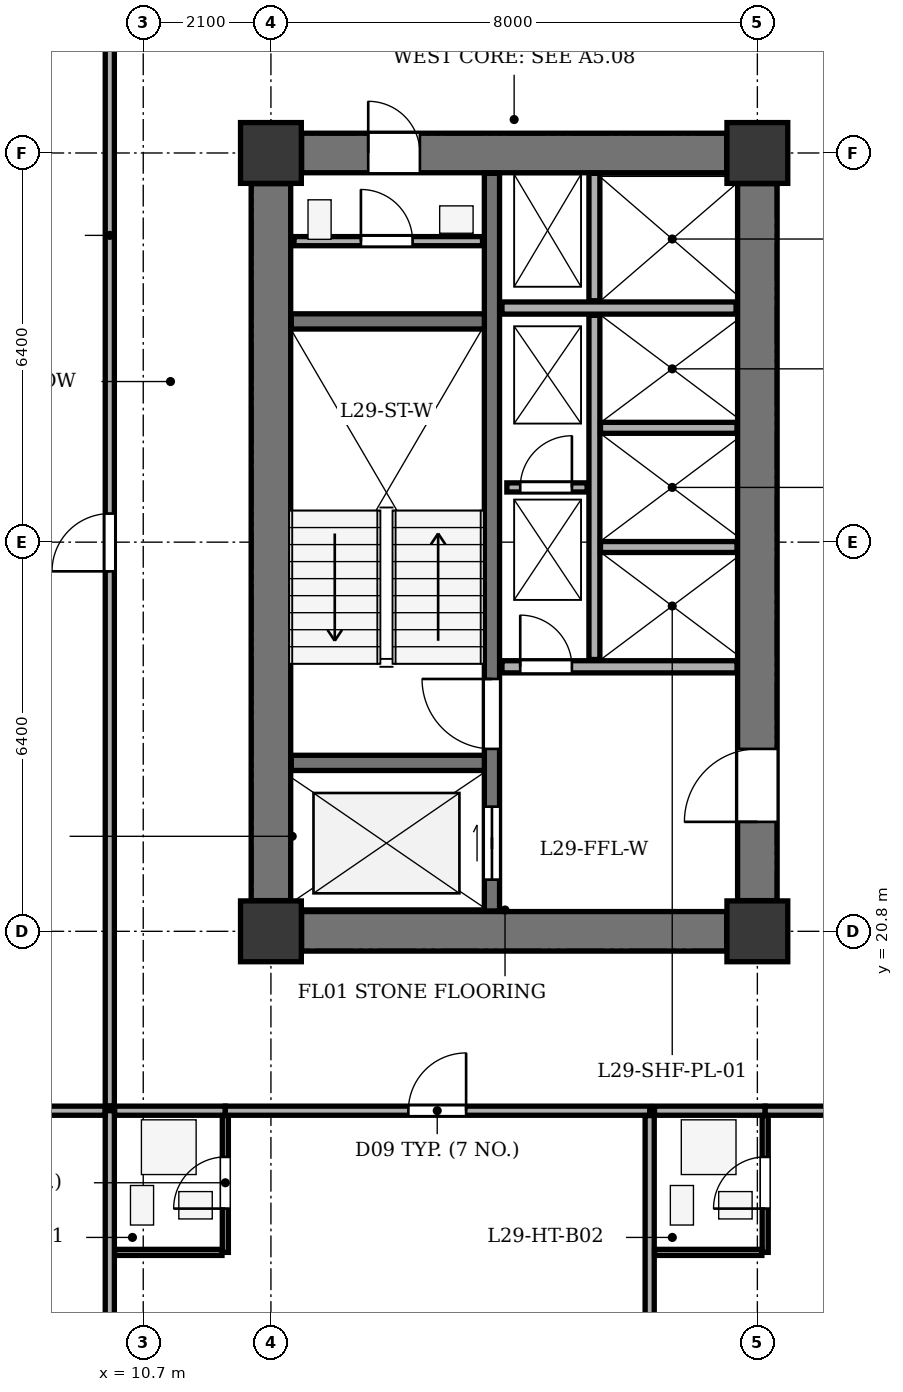
"""IFC4 building model, lengths in metres.
Left out: names, types, materials, properties, quantities, classifications, styles, units other than length and angle.
Written with IfcOpenShell. Run it as: python <this file> out.ifc"""

import sys

from ifc_helpers import new_model, si_unit, direction, frame, frame_2d, origin, origin_2d, place, context, subcontext, project, spatial, rectangle, extrude, element, fill, save


model = new_model("IFC4")
c1 = context("Model", 3, precision=1e-05, world=origin(), true_north=direction((0.0, 1.0)))
c2 = subcontext(c1, "Body", "Model", "MODEL_VIEW")
j1 = project(units=[si_unit("LENGTHUNIT", "METRE"), si_unit("PLANEANGLEUNIT", "RADIAN")], contexts=[c1])
p1 = place(None, origin())
s1 = spatial("IfcSite", under=j1, at=p1, CompositionType="ELEMENT")
p2 = place(p1, origin())
s2 = spatial("IfcBuilding", under=s1, at=p2, CompositionType="ELEMENT")
p3 = place(p2, frame((0.0, 0.0, 120.3)))
s3 = spatial("IfcBuildingStorey", under=s2, at=p3, CompositionType="ELEMENT", Elevation=120.3)
for number, where, z_axis, x_axis in (
    (1, (12.8, 20.8, 0.0), (0.0, 0.0, 1.0), (1.0, 0.0, 0.0)),
    (2, (20.8, 20.8, 0.0), (0.0, 0.0, 1.0), (1.0, 0.0, 0.0)),
    (3, (12.8, 33.6, 0.0), (0.0, 0.0, 1.0), (1.0, 0.0, 0.0)),
    (4, (20.8, 33.6, 0.0), (0.0, 0.0, 1.0), (1.0, 0.0, 0.0)),
):
    element("IfcColumn", number, at=place(p3, frame(where, z_axis=z_axis, x_axis=x_axis)), inside=s3, PredefinedType="COLUMN", context=c2, shape_type="SweptSolid", body=[
        extrude(rectangle(XDim=1.0, YDim=1.0, at=origin_2d()), origin(), (0.0, 0.0, 1.0), 3.5),
    ])
p4 = place(p3, frame((12.8, 21.305, 0.0), z_axis=(0.0, 0.0, 1.0), x_axis=(0.0, 1.0, 0.0)))
e5 = element("IfcWall", 5, at=p4, inside=s3, PredefinedType="SHEAR", context=c2, shape_type="SweptSolid", body=[
    extrude(rectangle(XDim=11.79, YDim=0.65, at=frame_2d((5.895, 0.0))), origin(), (0.0, 0.0, 1.0), 3.2),
])
p5 = place(p3, frame((13.305, 20.8, 0.0), z_axis=(0.0, 0.0, 1.0), x_axis=(1.0, 0.0, 0.0)))
e6 = element("IfcWall", 6, at=p5, inside=s3, PredefinedType="SHEAR", context=c2, shape_type="SweptSolid", body=[
    extrude(rectangle(XDim=6.99, YDim=0.65, at=frame_2d((3.495, 0.0))), origin(), (0.0, 0.0, 1.0), 3.2),
])
p6 = place(p3, frame((13.305, 33.6, 0.0), z_axis=(0.0, 0.0, 1.0), x_axis=(1.0, 0.0, 0.0)))
e7 = element("IfcWall", 7, at=p6, inside=s3, PredefinedType="SHEAR", context=c2, shape_type="SweptSolid", body=[
    extrude(rectangle(XDim=6.99, YDim=0.65, at=frame_2d((3.495, 0.0))), origin(), (0.0, 0.0, 1.0), 3.2),
])
p7 = place(p6, frame((1.095, 0.0, 0.0)))
e8 = element("IfcOpeningElement", 8, at=p7, cuts=e7, PredefinedType="OPENING", context=c2, shape_type="SweptSolid", body=[
    extrude(rectangle(XDim=0.85, YDim=2.02, at=frame_2d((0.425, 1.01))), frame((0.0, 0.335, 0.0), z_axis=(0.0, -1.0, 0.0), x_axis=(1.0, 0.0, 0.0)), (0.0, 0.0, 1.0), 0.67),
])
p8 = place(p3, frame((20.8, 21.305, 0.0), z_axis=(0.0, 0.0, 1.0), x_axis=(0.0, 1.0, 0.0)))
e9 = element("IfcWall", 9, at=p8, inside=s3, PredefinedType="SHEAR", context=c2, shape_type="SweptSolid", body=[
    extrude(rectangle(XDim=11.79, YDim=0.65, at=frame_2d((5.895, 0.0))), origin(), (0.0, 0.0, 1.0), 3.2),
])
p9 = place(p8, frame((1.295, 0.0, 0.0)))
e10 = element("IfcOpeningElement", 10, at=p9, cuts=e9, PredefinedType="OPENING", context=c2, shape_type="SweptSolid", body=[
    extrude(rectangle(XDim=1.2, YDim=2.15, at=frame_2d((0.6, 1.075))), frame((0.0, 0.335, 0.0), z_axis=(0.0, -1.0, 0.0), x_axis=(1.0, 0.0, 0.0)), (0.0, 0.0, 1.0), 0.67),
])
p10 = place(p3, frame((16.435, 21.135, 0.0), z_axis=(0.0, 0.0, 1.0), x_axis=(0.0, 1.0, 0.0)))
e11 = element("IfcWall", 11, at=p10, inside=s3, PredefinedType="SHEAR", context=c2, shape_type="SweptSolid", body=[
    extrude(rectangle(XDim=12.13, YDim=0.25, at=frame_2d((6.065, 0.0))), origin(), (0.0, 0.0, 1.0), 3.2),
])
p11 = place(p10, frame((0.515, 0.0, 0.0)))
e12 = element("IfcOpeningElement", 12, at=p11, cuts=e11, PredefinedType="OPENING", context=c2, shape_type="SweptSolid", body=[
    extrude(rectangle(XDim=1.2, YDim=2.15, at=frame_2d((0.6, 1.075))), frame((0.0, 0.135, 0.0), z_axis=(0.0, -1.0, 0.0), x_axis=(1.0, 0.0, 0.0)), (0.0, 0.0, 1.0), 0.27),
])
p12 = place(p10, frame((2.665, 0.0, 0.0)))
e13 = element("IfcOpeningElement", 13, at=p12, cuts=e11, PredefinedType="OPENING", context=c2, shape_type="SweptSolid", body=[
    extrude(rectangle(XDim=1.15, YDim=2.15, at=frame_2d((0.575, 1.075))), frame((0.0, 0.135, 0.0), z_axis=(0.0, -1.0, 0.0), x_axis=(1.0, 0.0, 0.0)), (0.0, 0.0, 1.0), 0.27),
])
for number, where, z_axis, x_axis in (
    (14, (13.135, 23.57, 0.0), (0.0, 0.0, 1.0), (1.0, 0.0, 0.0)),
    (15, (13.135, 30.83, 0.0), (0.0, 0.0, 1.0), (1.0, 0.0, 0.0)),
):
    element("IfcWall", number, at=place(p3, frame(where, z_axis=z_axis, x_axis=x_axis)), inside=s3, PredefinedType="SHEAR", context=c2, shape_type="SweptSolid", body=[
        extrude(rectangle(XDim=3.175, YDim=0.25, at=frame_2d((1.587, 0.0))), origin(), (0.0, 0.0, 1.0), 3.2),
    ])
p13 = place(p3, frame((16.6, 25.15, 0.0), z_axis=(0.0, 0.0, 1.0), x_axis=(1.0, 0.0, 0.0)))
e16 = element("IfcWall", 16, at=p13, inside=s3, PredefinedType="SOLIDWALL", context=c2, shape_type="SweptSolid", body=[
    extrude(rectangle(XDim=3.865, YDim=0.2, at=frame_2d((1.933, 0.0))), origin(), (0.0, 0.0, 1.0), 3.2),
])
p14 = place(p13, frame((0.3, 0.0, 0.0)))
e17 = element("IfcOpeningElement", 17, at=p14, cuts=e16, PredefinedType="OPENING", context=c2, shape_type="SweptSolid", body=[
    extrude(rectangle(XDim=0.85, YDim=2.02, at=frame_2d((0.425, 1.01))), frame((0.0, 0.11, 0.0), z_axis=(0.0, -1.0, 0.0), x_axis=(1.0, 0.0, 0.0)), (0.0, 0.0, 1.0), 0.22),
])
p15 = place(p3, frame((16.6, 31.05, 0.0), z_axis=(0.0, 0.0, 1.0), x_axis=(1.0, 0.0, 0.0)))
e18 = element("IfcWall", 18, at=p15, inside=s3, PredefinedType="SOLIDWALL", context=c2, shape_type="SweptSolid", body=[
    extrude(rectangle(XDim=3.85, YDim=0.2, at=frame_2d((1.925, 0.0))), origin(), (0.0, 0.0, 1.0), 3.2),
])
p16 = place(p3, frame((18.12, 25.27, 0.0), z_axis=(0.0, 0.0, 1.0), x_axis=(0.0, 1.0, 0.0)))
e19 = element("IfcWall", 19, at=p16, inside=s3, PredefinedType="PARTITIONING", context=c2, shape_type="SweptSolid", body=[
    extrude(rectangle(XDim=5.66, YDim=0.18, at=frame_2d((2.83, 0.0))), origin(), (0.0, 0.0, 1.0), 3.2),
])
p17 = place(p3, frame((18.12, 31.17, 0.0), z_axis=(0.0, 0.0, 1.0), x_axis=(0.0, 1.0, 0.0)))
e20 = element("IfcWall", 20, at=p17, inside=s3, PredefinedType="PARTITIONING", context=c2, shape_type="SweptSolid", body=[
    extrude(rectangle(XDim=2.095, YDim=0.18, at=frame_2d((1.047, 0.0))), origin(), (0.0, 0.0, 1.0), 3.2),
])
for number, where, z_axis, x_axis in (
    (21, (18.22, 27.12, 0.0), (0.0, 0.0, 1.0), (1.0, 0.0, 0.0)),
    (22, (18.22, 29.08, 0.0), (0.0, 0.0, 1.0), (1.0, 0.0, 0.0)),
):
    element("IfcWall", number, at=place(p3, frame(where, z_axis=z_axis, x_axis=x_axis)), inside=s3, PredefinedType="PARTITIONING", context=c2, shape_type="SweptSolid", body=[
        extrude(rectangle(XDim=2.245, YDim=0.18, at=frame_2d((1.123, 0.0))), origin(), (0.0, 0.0, 1.0), 3.2),
    ])
p18 = place(p3, frame((13.18, 32.15, 0.0), z_axis=(0.0, 0.0, 1.0), x_axis=(1.0, 0.0, 0.0)))
e23 = element("IfcWall", 23, at=p18, inside=s3, PredefinedType="PARTITIONING", context=c2, shape_type="SweptSolid", body=[
    extrude(rectangle(XDim=3.1, YDim=0.15, at=frame_2d((1.55, 0.0))), origin(), (0.0, 0.0, 1.0), 3.2),
])
p19 = place(p18, frame((1.1, 0.0, 0.0)))
e24 = element("IfcOpeningElement", 24, at=p19, cuts=e23, PredefinedType="OPENING", context=c2, shape_type="SweptSolid", body=[
    extrude(rectangle(XDim=0.85, YDim=2.02, at=frame_2d((0.425, 1.01))), frame((0.0, 0.085, 0.0), z_axis=(0.0, -1.0, 0.0), x_axis=(1.0, 0.0, 0.0)), (0.0, 0.0, 1.0), 0.17),
])
p20 = place(p3, frame((16.68, 28.1, 0.0), z_axis=(0.0, 0.0, 1.0), x_axis=(1.0, 0.0, 0.0)))
e25 = element("IfcWall", 25, at=p20, inside=s3, PredefinedType="PARTITIONING", context=c2, shape_type="SweptSolid", body=[
    extrude(rectangle(XDim=1.32, YDim=0.15, at=frame_2d((0.66, 0.0))), origin(), (0.0, 0.0, 1.0), 3.2),
])
p21 = place(p20, frame((0.22, 0.0, 0.0)))
e26 = element("IfcOpeningElement", 26, at=p21, cuts=e25, PredefinedType="OPENING", context=c2, shape_type="SweptSolid", body=[
    extrude(rectangle(XDim=0.85, YDim=2.02, at=frame_2d((0.425, 1.01))), frame((0.0, 0.085, 0.0), z_axis=(0.0, -1.0, 0.0), x_axis=(1.0, 0.0, 0.0)), (0.0, 0.0, 1.0), 0.17),
])
p22 = place(p3, frame((10.15, 1.875, 0.0), z_axis=(0.0, 0.0, 1.0), x_axis=(0.0, 1.0, 0.0)))
e27 = element("IfcWall", 27, at=p22, inside=s3, PredefinedType="PARTITIONING", context=c2, shape_type="SweptSolid", body=[
    extrude(rectangle(XDim=15.975, YDim=0.15, at=frame_2d((7.988, 0.0))), origin(), (0.0, 0.0, 1.0), 3.2),
])
p23 = place(p3, frame((10.23, 17.85, 0.0), z_axis=(0.0, 0.0, 1.0), x_axis=(1.0, 0.0, 0.0)))
e28 = element("IfcWall", 28, at=p23, inside=s3, PredefinedType="PARTITIONING", context=c2, shape_type="SweptSolid", body=[
    extrude(rectangle(XDim=1.82, YDim=0.15, at=frame_2d((0.91, 0.0))), origin(), (0.0, 0.0, 1.0), 3.2),
])
p24 = place(p3, frame((12.05, 17.85, 0.0), z_axis=(0.0, 0.0, 1.0), x_axis=(1.0, 0.0, 0.0)))
e29 = element("IfcWall", 29, at=p24, inside=s3, PredefinedType="PARTITIONING", context=c2, shape_type="SweptSolid", body=[
    extrude(rectangle(XDim=6.979, YDim=0.15, at=frame_2d((3.49, 0.0))), origin(), (0.0, 0.0, 1.0), 3.2),
])
p25 = place(p24, frame((3.01, 0.0, 0.0)))
e30 = element("IfcOpeningElement", 30, at=p25, cuts=e29, PredefinedType="OPENING", context=c2, shape_type="SweptSolid", body=[
    extrude(rectangle(XDim=0.95, YDim=2.1, at=frame_2d((0.475, 1.05))), frame((0.0, 0.085, 0.0), z_axis=(0.0, -1.0, 0.0), x_axis=(1.0, 0.0, 0.0)), (0.0, 0.0, 1.0), 0.17),
])
p26 = place(p3, frame((12.05, 15.52, 0.0), z_axis=(0.0, 0.0, 1.0), x_axis=(0.0, 1.0, 0.0)))
e31 = element("IfcWall", 31, at=p26, inside=s3, PredefinedType="PARTITIONING", context=c2, shape_type="SweptSolid", body=[
    extrude(rectangle(XDim=2.25, YDim=0.1, at=frame_2d((1.125, 0.0))), origin(), (0.0, 0.0, 1.0), 3.2),
])
p27 = place(p26, frame((0.72, 0.0, 0.0)))
e32 = element("IfcOpeningElement", 32, at=p27, cuts=e31, PredefinedType="OPENING", context=c2, shape_type="SweptSolid", body=[
    extrude(rectangle(XDim=0.85, YDim=2.05, at=frame_2d((0.425, 1.025))), frame((0.0, 0.06, 0.0), z_axis=(0.0, -1.0, 0.0), x_axis=(1.0, 0.0, 0.0)), (0.0, 0.0, 1.0), 0.12),
])
p28 = place(p3, frame((10.23, 15.52, 0.0), z_axis=(0.0, 0.0, 1.0), x_axis=(1.0, 0.0, 0.0)))
e33 = element("IfcWall", 33, at=p28, inside=s3, PredefinedType="PARTITIONING", context=c2, shape_type="SweptSolid", body=[
    extrude(rectangle(XDim=1.765, YDim=0.1, at=frame_2d((0.883, 0.0))), origin(), (0.0, 0.0, 1.0), 3.2),
])
p29 = place(p3, frame((19.029, 1.875, 0.0), z_axis=(0.0, 0.0, 1.0), x_axis=(0.0, 1.0, 0.0)))
e34 = element("IfcWall", 34, at=p29, inside=s3, PredefinedType="PARTITIONING", context=c2, shape_type="SweptSolid", body=[
    extrude(rectangle(XDim=15.895, YDim=0.15, at=frame_2d((7.948, 0.0))), origin(), (0.0, 0.0, 1.0), 3.2),
])
p30 = place(p3, frame((19.109, 17.85, 0.0), z_axis=(0.0, 0.0, 1.0), x_axis=(1.0, 0.0, 0.0)))
e35 = element("IfcWall", 35, at=p30, inside=s3, PredefinedType="PARTITIONING", context=c2, shape_type="SweptSolid", body=[
    extrude(rectangle(XDim=1.82, YDim=0.15, at=frame_2d((0.91, 0.0))), origin(), (0.0, 0.0, 1.0), 3.2),
])
p31 = place(p3, frame((20.929, 17.85, 0.0), z_axis=(0.0, 0.0, 1.0), x_axis=(1.0, 0.0, 0.0)))
e36 = element("IfcWall", 36, at=p31, inside=s3, PredefinedType="PARTITIONING", context=c2, shape_type="SweptSolid", body=[
    extrude(rectangle(XDim=7.662, YDim=0.15, at=frame_2d((3.831, 0.0))), origin(), (0.0, 0.0, 1.0), 3.2),
])
p32 = place(p31, frame((3.351, 0.0, 0.0)))
e37 = element("IfcOpeningElement", 37, at=p32, cuts=e36, PredefinedType="OPENING", context=c2, shape_type="SweptSolid", body=[
    extrude(rectangle(XDim=0.95, YDim=2.1, at=frame_2d((0.475, 1.05))), frame((0.0, 0.085, 0.0), z_axis=(0.0, -1.0, 0.0), x_axis=(1.0, 0.0, 0.0)), (0.0, 0.0, 1.0), 0.17),
])
p33 = place(p3, frame((20.929, 15.52, 0.0), z_axis=(0.0, 0.0, 1.0), x_axis=(0.0, 1.0, 0.0)))
e38 = element("IfcWall", 38, at=p33, inside=s3, PredefinedType="PARTITIONING", context=c2, shape_type="SweptSolid", body=[
    extrude(rectangle(XDim=2.25, YDim=0.1, at=frame_2d((1.125, 0.0))), origin(), (0.0, 0.0, 1.0), 2.535),
])
p34 = place(p33, frame((0.72, 0.0, 0.0)))
e39 = element("IfcOpeningElement", 39, at=p34, cuts=e38, PredefinedType="OPENING", context=c2, shape_type="SweptSolid", body=[
    extrude(rectangle(XDim=0.85, YDim=2.05, at=frame_2d((0.425, 1.025))), frame((0.0, 0.06, 0.0), z_axis=(0.0, -1.0, 0.0), x_axis=(1.0, 0.0, 0.0)), (0.0, 0.0, 1.0), 0.12),
])
p35 = place(p3, frame((19.109, 15.52, 0.0), z_axis=(0.0, 0.0, 1.0), x_axis=(1.0, 0.0, 0.0)))
e40 = element("IfcWall", 40, at=p35, inside=s3, PredefinedType="PARTITIONING", context=c2, shape_type="SweptSolid", body=[
    extrude(rectangle(XDim=1.765, YDim=0.1, at=frame_2d((0.883, 0.0))), origin(), (0.0, 0.0, 1.0), 3.2),
])
p36 = place(p3, frame((4.675, 17.85, 0.0), z_axis=(0.0, 0.0, 1.0), x_axis=(1.0, 0.0, 0.0)))
e41 = element("IfcWall", 41, at=p36, inside=s3, PredefinedType="PARTITIONING", context=c2, shape_type="SweptSolid", body=[
    extrude(rectangle(XDim=5.395, YDim=0.15, at=frame_2d((2.698, 0.0))), origin(), (0.0, 0.0, 1.0), 3.2),
])
p37 = place(p3, frame((10.15, 17.93, 0.0), z_axis=(0.0, 0.0, 1.0), x_axis=(0.0, 1.0, 0.0)))
e42 = element("IfcWall", 42, at=p37, inside=s3, PredefinedType="PARTITIONING", context=c2, shape_type="SweptSolid", body=[
    extrude(rectangle(XDim=18.54, YDim=0.15, at=frame_2d((9.27, 0.0))), origin(), (0.0, 0.0, 1.0), 3.2),
])
p38 = place(p37, frame((8.79, 0.0, 0.0)))
e43 = element("IfcOpeningElement", 43, at=p38, cuts=e42, PredefinedType="OPENING", context=c2, shape_type="SweptSolid", body=[
    extrude(rectangle(XDim=0.95, YDim=2.1, at=frame_2d((0.475, 1.05))), frame((0.0, 0.085, 0.0), z_axis=(0.0, -1.0, 0.0), x_axis=(1.0, 0.0, 0.0)), (0.0, 0.0, 1.0), 0.17),
])
p39 = place(p7, origin())
e44 = element("IfcDoor", 44, at=p39, inside=s3, OperationType="SINGLE_SWING_LEFT", PredefinedType="DOOR", context=c2, shape_type="SweptSolid", body=[
    extrude(rectangle(XDim=0.85, YDim=2.02, at=frame_2d((0.425, 1.01))), frame((0.0, 0.025, 0.0), z_axis=(0.0, -1.0, 0.0), x_axis=(1.0, 0.0, 0.0)), (0.0, 0.0, 1.0), 0.05),
])
fill(e8, e44)
p40 = place(p9, origin())
e45 = element("IfcDoor", 45, at=p40, inside=s3, OperationType="SINGLE_SWING_LEFT", PredefinedType="DOOR", context=c2, shape_type="SweptSolid", body=[
    extrude(rectangle(XDim=1.2, YDim=2.15, at=frame_2d((0.6, 1.075))), frame((0.0, 0.025, 0.0), z_axis=(0.0, -1.0, 0.0), x_axis=(1.0, 0.0, 0.0)), (0.0, 0.0, 1.0), 0.05),
])
fill(e10, e45)
p41 = place(p11, origin())
e46 = element("IfcDoor", 46, at=p41, inside=s3, OperationType="DOUBLE_DOOR_SLIDING", PredefinedType="DOOR", context=c2, shape_type="SweptSolid", body=[
    extrude(rectangle(XDim=1.2, YDim=2.15, at=frame_2d((0.6, 1.075))), frame((0.0, 0.025, 0.0), z_axis=(0.0, -1.0, 0.0), x_axis=(1.0, 0.0, 0.0)), (0.0, 0.0, 1.0), 0.05),
])
fill(e12, e46)
p42 = place(p12, origin())
e47 = element("IfcDoor", 47, at=p42, inside=s3, OperationType="SINGLE_SWING_RIGHT", PredefinedType="DOOR", context=c2, shape_type="SweptSolid", body=[
    extrude(rectangle(XDim=1.15, YDim=2.15, at=frame_2d((0.575, 1.075))), frame((0.0, 0.025, 0.0), z_axis=(0.0, -1.0, 0.0), x_axis=(1.0, 0.0, 0.0)), (0.0, 0.0, 1.0), 0.05),
])
fill(e13, e47)
p43 = place(p14, origin())
e48 = element("IfcDoor", 48, at=p43, inside=s3, OperationType="SINGLE_SWING_LEFT", PredefinedType="DOOR", context=c2, shape_type="SweptSolid", body=[
    extrude(rectangle(XDim=0.85, YDim=2.02, at=frame_2d((0.425, 1.01))), frame((0.0, 0.025, 0.0), z_axis=(0.0, -1.0, 0.0), x_axis=(1.0, 0.0, 0.0)), (0.0, 0.0, 1.0), 0.05),
])
fill(e17, e48)
p44 = place(p19, origin())
e49 = element("IfcDoor", 49, at=p44, inside=s3, OperationType="SINGLE_SWING_LEFT", PredefinedType="DOOR", context=c2, shape_type="SweptSolid", body=[
    extrude(rectangle(XDim=0.85, YDim=2.02, at=frame_2d((0.425, 1.01))), frame((0.0, 0.025, 0.0), z_axis=(0.0, -1.0, 0.0), x_axis=(1.0, 0.0, 0.0)), (0.0, 0.0, 1.0), 0.05),
])
fill(e24, e49)
p45 = place(p21, origin())
e50 = element("IfcDoor", 50, at=p45, inside=s3, OperationType="SINGLE_SWING_RIGHT", PredefinedType="DOOR", context=c2, shape_type="SweptSolid", body=[
    extrude(rectangle(XDim=0.85, YDim=2.02, at=frame_2d((0.425, 1.01))), frame((0.0, 0.025, 0.0), z_axis=(0.0, -1.0, 0.0), x_axis=(1.0, 0.0, 0.0)), (0.0, 0.0, 1.0), 0.05),
])
fill(e26, e50)
p46 = place(p27, origin())
e51 = element("IfcDoor", 51, at=p46, inside=s3, OperationType="SINGLE_SWING_LEFT", PredefinedType="DOOR", context=c2, shape_type="SweptSolid", body=[
    extrude(rectangle(XDim=0.85, YDim=2.05, at=frame_2d((0.425, 1.025))), frame((0.0, 0.025, 0.0), z_axis=(0.0, -1.0, 0.0), x_axis=(1.0, 0.0, 0.0)), (0.0, 0.0, 1.0), 0.05),
])
fill(e32, e51)
p47 = place(p25, origin())
e52 = element("IfcDoor", 52, at=p47, inside=s3, OperationType="SINGLE_SWING_RIGHT", PredefinedType="DOOR", context=c2, shape_type="SweptSolid", body=[
    extrude(rectangle(XDim=0.95, YDim=2.1, at=frame_2d((0.475, 1.05))), frame((0.0, 0.025, 0.0), z_axis=(0.0, -1.0, 0.0), x_axis=(1.0, 0.0, 0.0)), (0.0, 0.0, 1.0), 0.05),
])
fill(e30, e52)
p48 = place(p34, origin())
e53 = element("IfcDoor", 53, at=p48, inside=s3, OperationType="SINGLE_SWING_LEFT", PredefinedType="DOOR", context=c2, shape_type="SweptSolid", body=[
    extrude(rectangle(XDim=0.85, YDim=2.05, at=frame_2d((0.425, 1.025))), frame((0.0, 0.025, 0.0), z_axis=(0.0, -1.0, 0.0), x_axis=(1.0, 0.0, 0.0)), (0.0, 0.0, 1.0), 0.05),
])
fill(e39, e53)
p49 = place(p38, origin())
e54 = element("IfcDoor", 54, at=p49, inside=s3, OperationType="SINGLE_SWING_LEFT", PredefinedType="DOOR", context=c2, shape_type="SweptSolid", body=[
    extrude(rectangle(XDim=0.95, YDim=2.1, at=frame_2d((0.475, 1.05))), frame((0.0, 0.025, 0.0), z_axis=(0.0, -1.0, 0.0), x_axis=(1.0, 0.0, 0.0)), (0.0, 0.0, 1.0), 0.05),
])
fill(e43, e54)
save(model, sys.argv[1])
